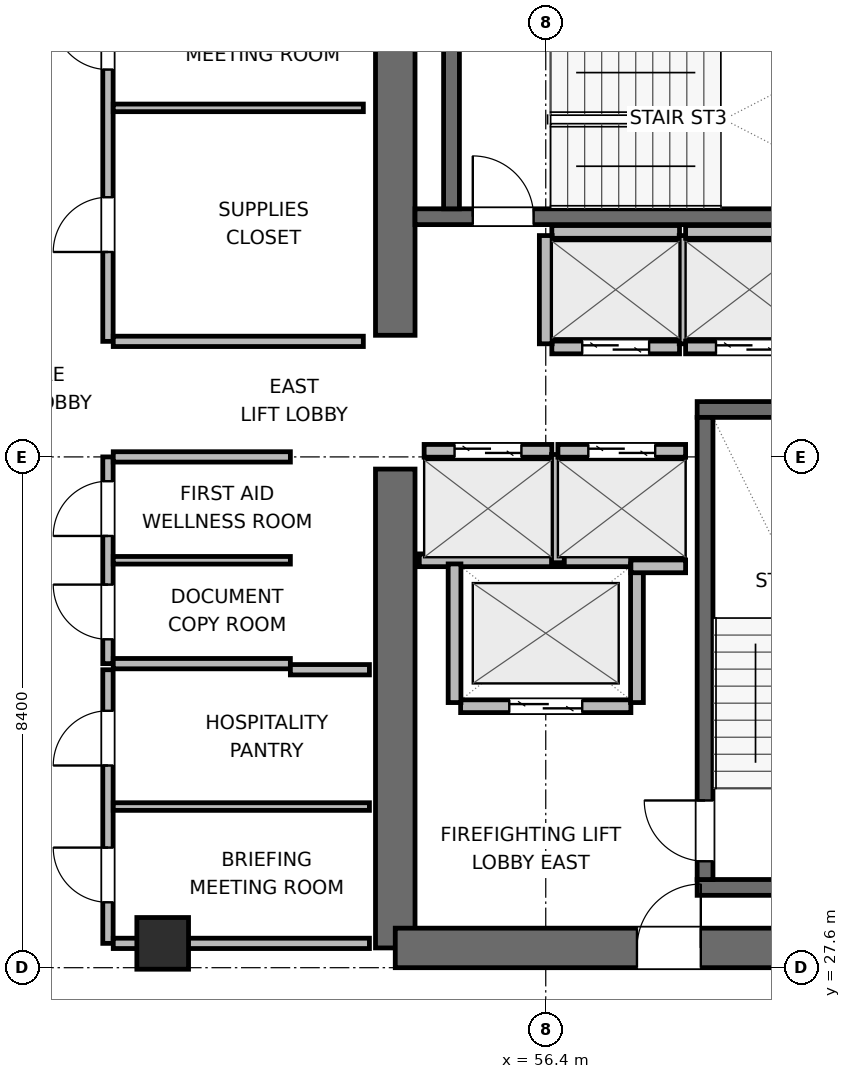
"""IFC4 building model, lengths in metres.
Left out: names, types, materials, properties, quantities, classifications, styles, units other than length and angle.
Written with IfcOpenShell. Run it as: python <this file> out.ifc"""

import sys

from ifc_helpers import new_model, si_unit, direction, frame, frame_2d, origin, origin_2d, place, context, subcontext, project, spatial, rectangle, extrude, element, fill, save


model = new_model("IFC4")
c1 = context("Model", 3, precision=1e-05, world=origin(), true_north=direction((0.0, 1.0)))
c2 = subcontext(c1, "Body", "Model", "MODEL_VIEW")
j1 = project(units=[si_unit("LENGTHUNIT", "METRE"), si_unit("PLANEANGLEUNIT", "RADIAN")], contexts=[c1])
p1 = place(None, origin())
s1 = spatial("IfcSite", under=j1, at=p1, CompositionType="ELEMENT")
p2 = place(p1, origin())
s2 = spatial("IfcBuilding", under=s1, at=p2, CompositionType="ELEMENT")
p3 = place(p2, frame((0.0, 0.0, 231.0)))
s3 = spatial("IfcBuildingStorey", under=s2, at=p3, CompositionType="ELEMENT", Elevation=231.0)
p4 = place(p3, frame((53.925, 27.925, 0.0), z_axis=(0.0, 0.0, 1.0), x_axis=(0.0, 1.0, 0.0)))
e1 = element("IfcWall", 1, at=p4, inside=s3, PredefinedType="SHEAR", context=c2, shape_type="SweptSolid", body=[
    extrude(rectangle(XDim=7.875, YDim=0.65, at=frame_2d((3.938, 0.0))), origin(), (0.0, 0.0, 1.0), 3.9),
])
p5 = place(p3, frame((53.925, 38.0, 0.0), z_axis=(0.0, 0.0, 1.0), x_axis=(0.0, 1.0, 0.0)))
e2 = element("IfcWall", 2, at=p5, inside=s3, PredefinedType="SHEAR", context=c2, shape_type="SweptSolid", body=[
    extrude(rectangle(XDim=6.075, YDim=0.65, at=frame_2d((3.038, 0.0))), origin(), (0.0, 0.0, 1.0), 3.9),
])
p6 = place(p3, frame((53.925, 27.925, 0.0), z_axis=(0.0, 0.0, 1.0), x_axis=(1.0, 0.0, 0.0)))
e3 = element("IfcWall", 3, at=p6, inside=s3, PredefinedType="SHEAR", context=c2, shape_type="SweptSolid", body=[
    extrude(rectangle(XDim=9.35, YDim=0.65, at=frame_2d((4.675, 0.0))), origin(), (0.0, 0.0, 1.0), 3.9),
])
p7 = place(p6, frame((3.975, 0.0, 0.0)))
e4 = element("IfcOpeningElement", 4, at=p7, cuts=e3, PredefinedType="OPENING", context=c2, shape_type="SweptSolid", body=[
    extrude(rectangle(XDim=1.05, YDim=2.04, at=frame_2d((0.525, 1.02))), frame((0.0, 0.335, 0.0), z_axis=(0.0, -1.0, 0.0), x_axis=(1.0, 0.0, 0.0)), (0.0, 0.0, 1.0), 0.67),
])
for number, where, z_axis, x_axis in (
    (5, (58.89, 28.92, 0.0), (0.0, 0.0, 1.0), (1.0, 0.0, 0.0)),
    (6, (58.89, 36.78, 0.0), (0.0, 0.0, 1.0), (1.0, 0.0, 0.0)),
):
    element("IfcWall", number, at=place(p3, frame(where, z_axis=z_axis, x_axis=x_axis)), inside=s3, PredefinedType="SHEAR", context=c2, shape_type="SweptSolid", body=[
        extrude(rectangle(XDim=4.06, YDim=0.26, at=frame_2d((2.03, 0.0))), origin(), (0.0, 0.0, 1.0), 3.9),
    ])
p8 = place(p3, frame((59.02, 29.05, 0.0), z_axis=(0.0, 0.0, 1.0), x_axis=(0.0, 1.0, 0.0)))
e7 = element("IfcWall", 7, at=p8, inside=s3, PredefinedType="SHEAR", context=c2, shape_type="SweptSolid", body=[
    extrude(rectangle(XDim=7.6, YDim=0.26, at=frame_2d((3.8, 0.0))), origin(), (0.0, 0.0, 1.0), 3.9),
])
p9 = place(p8, frame((0.3, 0.0, 0.0)))
e8 = element("IfcOpeningElement", 8, at=p9, cuts=e7, PredefinedType="OPENING", context=c2, shape_type="SweptSolid", body=[
    extrude(rectangle(XDim=1.0, YDim=2.04, at=frame_2d((0.5, 1.02))), frame((0.0, 0.14, 0.0), z_axis=(0.0, -1.0, 0.0), x_axis=(1.0, 0.0, 0.0)), (0.0, 0.0, 1.0), 0.28),
])
p10 = place(p3, frame((54.25, 39.95, 0.0), z_axis=(0.0, 0.0, 1.0), x_axis=(1.0, 0.0, 0.0)))
e9 = element("IfcWall", 9, at=p10, inside=s3, PredefinedType="SHEAR", context=c2, shape_type="SweptSolid", body=[
    extrude(rectangle(XDim=8.7, YDim=0.26, at=frame_2d((4.35, 0.0))), origin(), (0.0, 0.0, 1.0), 3.9),
])
p11 = place(p10, frame((0.95, 0.0, 0.0)))
e10 = element("IfcOpeningElement", 10, at=p11, cuts=e9, PredefinedType="OPENING", context=c2, shape_type="SweptSolid", body=[
    extrude(rectangle(XDim=1.0, YDim=2.04, at=frame_2d((0.5, 1.02))), frame((0.0, 0.14, 0.0), z_axis=(0.0, -1.0, 0.0), x_axis=(1.0, 0.0, 0.0)), (0.0, 0.0, 1.0), 0.28),
])
p12 = place(p3, frame((54.85, 40.08, 0.0), z_axis=(0.0, 0.0, 1.0), x_axis=(0.0, 1.0, 0.0)))
e11 = element("IfcWall", 11, at=p12, inside=s3, PredefinedType="SHEAR", context=c2, shape_type="SweptSolid", body=[
    extrude(rectangle(XDim=2.94, YDim=0.26, at=frame_2d((1.47, 0.0))), origin(), (0.0, 0.0, 1.0), 3.9),
])
p13 = place(p3, frame((50.1, 28.0, 0.0), z_axis=(0.0, 0.0, 1.0), x_axis=(1.0, 0.0, 0.0)))
e12 = element("IfcColumn", 12, at=p13, inside=s3, PredefinedType="COLUMN", context=c2, shape_type="SweptSolid", body=[
    extrude(rectangle(XDim=0.85, YDim=0.85, at=origin_2d()), origin(), (0.0, 0.0, 1.0), 3.9),
])
p14 = place(p3, frame((55.0, 31.9, 0.0), z_axis=(0.0, 0.0, 1.0), x_axis=(1.0, 0.0, 0.0)))
e13 = element("IfcWall", 13, at=p14, inside=s3, PredefinedType="PARTITIONING", context=c2, shape_type="SweptSolid", body=[
    extrude(rectangle(XDim=2.8, YDim=0.21, at=frame_2d((1.4, 0.0))), origin(), (0.0, 0.0, 1.0), 3.68),
])
p15 = place(p14, frame((0.8, 0.0, 0.0)))
e14 = element("IfcOpeningElement", 14, at=p15, cuts=e13, PredefinedType="OPENING", context=c2, shape_type="SweptSolid", body=[
    extrude(rectangle(XDim=1.2, YDim=2.04, at=frame_2d((0.6, 1.02))), frame((0.0, 0.115, 0.0), z_axis=(0.0, -1.0, 0.0), x_axis=(1.0, 0.0, 0.0)), (0.0, 0.0, 1.0), 0.23),
])
p16 = place(p3, frame((54.32, 34.3, 0.0), z_axis=(0.0, 0.0, 1.0), x_axis=(1.0, 0.0, 0.0)))
e15 = element("IfcWall", 15, at=p16, inside=s3, PredefinedType="PARTITIONING", context=c2, shape_type="SweptSolid", body=[
    extrude(rectangle(XDim=3.48, YDim=0.21, at=frame_2d((1.74, 0.0))), origin(), (0.0, 0.0, 1.0), 3.68),
])
for number, where, z_axis, x_axis in (
    (16, (54.9, 31.96, 0.0), (0.0, 0.0, 1.0), (0.0, 1.0, 0.0)),
    (17, (57.9, 31.96, 0.0), (0.0, 0.0, 1.0), (0.0, 1.0, 0.0)),
):
    element("IfcWall", number, at=place(p3, frame(where, z_axis=z_axis, x_axis=x_axis)), inside=s3, PredefinedType="PARTITIONING", context=c2, shape_type="SweptSolid", body=[
        extrude(rectangle(XDim=2.28, YDim=0.21, at=frame_2d((1.14, 0.0))), origin(), (0.0, 0.0, 1.0), 3.68),
    ])
p17 = place(p3, frame((54.4, 36.1, 0.0), z_axis=(0.0, 0.0, 1.0), x_axis=(1.0, 0.0, 0.0)))
e18 = element("IfcWall", 18, at=p17, inside=s3, PredefinedType="PARTITIONING", context=c2, shape_type="SweptSolid", body=[
    extrude(rectangle(XDim=2.1, YDim=0.21, at=frame_2d((1.05, 0.0))), origin(), (0.0, 0.0, 1.0), 3.68),
])
p18 = place(p17, frame((0.5, 0.0, 0.0)))
e19 = element("IfcOpeningElement", 19, at=p18, cuts=e18, PredefinedType="OPENING", context=c2, shape_type="SweptSolid", body=[
    extrude(rectangle(XDim=1.1, YDim=2.04, at=frame_2d((0.55, 1.02))), frame((0.0, 0.115, 0.0), z_axis=(0.0, -1.0, 0.0), x_axis=(1.0, 0.0, 0.0)), (0.0, 0.0, 1.0), 0.23),
])
p19 = place(p3, frame((56.6, 34.26, 0.0), z_axis=(0.0, 0.0, 1.0), x_axis=(0.0, 1.0, 0.0)))
e20 = element("IfcWall", 20, at=p19, inside=s3, PredefinedType="PARTITIONING", context=c2, shape_type="SweptSolid", body=[
    extrude(rectangle(XDim=1.78, YDim=0.21, at=frame_2d((0.89, 0.0))), origin(), (0.0, 0.0, 1.0), 3.68),
])
p20 = place(p3, frame((56.6, 36.1, 0.0), z_axis=(0.0, 0.0, 1.0), x_axis=(1.0, 0.0, 0.0)))
e21 = element("IfcWall", 21, at=p20, inside=s3, PredefinedType="PARTITIONING", context=c2, shape_type="SweptSolid", body=[
    extrude(rectangle(XDim=2.1, YDim=0.21, at=frame_2d((1.05, 0.0))), origin(), (0.0, 0.0, 1.0), 3.68),
])
p21 = place(p20, frame((0.5, 0.0, 0.0)))
e22 = element("IfcOpeningElement", 22, at=p21, cuts=e21, PredefinedType="OPENING", context=c2, shape_type="SweptSolid", body=[
    extrude(rectangle(XDim=1.1, YDim=2.04, at=frame_2d((0.55, 1.02))), frame((0.0, 0.115, 0.0), z_axis=(0.0, -1.0, 0.0), x_axis=(1.0, 0.0, 0.0)), (0.0, 0.0, 1.0), 0.23),
])
p22 = place(p3, frame((57.8, 34.2, 0.0), z_axis=(0.0, 0.0, 1.0), x_axis=(1.0, 0.0, 0.0)))
e23 = element("IfcWall", 23, at=p22, inside=s3, PredefinedType="PARTITIONING", context=c2, shape_type="SweptSolid", body=[
    extrude(rectangle(XDim=0.9, YDim=0.21, at=frame_2d((0.45, 0.0))), origin(), (0.0, 0.0, 1.0), 3.68),
])
p23 = place(p3, frame((56.5, 37.8, 0.0), z_axis=(0.0, 0.0, 1.0), x_axis=(1.0, 0.0, 0.0)))
e24 = element("IfcWall", 24, at=p23, inside=s3, PredefinedType="PARTITIONING", context=c2, shape_type="SweptSolid", body=[
    extrude(rectangle(XDim=2.1, YDim=0.21, at=frame_2d((1.05, 0.0))), origin(), (0.0, 0.0, 1.0), 3.68),
])
p24 = place(p23, frame((0.5, 0.0, 0.0)))
e25 = element("IfcOpeningElement", 25, at=p24, cuts=e24, PredefinedType="OPENING", context=c2, shape_type="SweptSolid", body=[
    extrude(rectangle(XDim=1.1, YDim=2.04, at=frame_2d((0.55, 1.02))), frame((0.0, 0.115, 0.0), z_axis=(0.0, -1.0, 0.0), x_axis=(1.0, 0.0, 0.0)), (0.0, 0.0, 1.0), 0.23),
])
p25 = place(p3, frame((56.5, 39.7, 0.0), z_axis=(0.0, 0.0, 1.0), x_axis=(1.0, 0.0, 0.0)))
e26 = element("IfcWall", 26, at=p25, inside=s3, PredefinedType="PARTITIONING", context=c2, shape_type="SweptSolid", body=[
    extrude(rectangle(XDim=2.1, YDim=0.21, at=frame_2d((1.05, 0.0))), origin(), (0.0, 0.0, 1.0), 3.68),
])
for number, where, z_axis, x_axis in (
    (27, (56.4, 37.86, 0.0), (0.0, 0.0, 1.0), (0.0, 1.0, 0.0)),
    (28, (58.7, 37.86, 0.0), (0.0, 0.0, 1.0), (0.0, 1.0, 0.0)),
):
    element("IfcWall", number, at=place(p3, frame(where, z_axis=z_axis, x_axis=x_axis)), inside=s3, PredefinedType="PARTITIONING", context=c2, shape_type="SweptSolid", body=[
        extrude(rectangle(XDim=1.78, YDim=0.21, at=frame_2d((0.89, 0.0))), origin(), (0.0, 0.0, 1.0), 3.68),
    ])
p26 = place(p3, frame((58.7, 37.8, 0.0), z_axis=(0.0, 0.0, 1.0), x_axis=(1.0, 0.0, 0.0)))
e29 = element("IfcWall", 29, at=p26, inside=s3, PredefinedType="PARTITIONING", context=c2, shape_type="SweptSolid", body=[
    extrude(rectangle(XDim=2.1, YDim=0.21, at=frame_2d((1.05, 0.0))), origin(), (0.0, 0.0, 1.0), 3.68),
])
p27 = place(p26, frame((0.5, 0.0, 0.0)))
e30 = element("IfcOpeningElement", 30, at=p27, cuts=e29, PredefinedType="OPENING", context=c2, shape_type="SweptSolid", body=[
    extrude(rectangle(XDim=1.1, YDim=2.04, at=frame_2d((0.55, 1.02))), frame((0.0, 0.115, 0.0), z_axis=(0.0, -1.0, 0.0), x_axis=(1.0, 0.0, 0.0)), (0.0, 0.0, 1.0), 0.23),
])
p28 = place(p3, frame((58.7, 39.7, 0.0), z_axis=(0.0, 0.0, 1.0), x_axis=(1.0, 0.0, 0.0)))
e31 = element("IfcWall", 31, at=p28, inside=s3, PredefinedType="PARTITIONING", context=c2, shape_type="SweptSolid", body=[
    extrude(rectangle(XDim=2.1, YDim=0.21, at=frame_2d((1.05, 0.0))), origin(), (0.0, 0.0, 1.0), 3.68),
])
p29 = place(p3, frame((49.2, 32.6, 0.0), z_axis=(0.0, 0.0, 1.0), x_axis=(0.0, 1.0, 0.0)))
e32 = element("IfcWall", 32, at=p29, inside=s3, PredefinedType="PARTITIONING", context=c2, shape_type="SweptSolid", body=[
    extrude(rectangle(XDim=3.4, YDim=0.17, at=frame_2d((1.7, 0.0))), origin(), (0.0, 0.0, 1.0), 3.68),
])
p30 = place(p29, frame((0.4, 0.0, 0.0)))
e33 = element("IfcOpeningElement", 33, at=p30, cuts=e32, PredefinedType="OPENING", context=c2, shape_type="SweptSolid", body=[
    extrude(rectangle(XDim=0.9, YDim=2.02, at=frame_2d((0.45, 1.01))), frame((0.0, 0.095, 0.0), z_axis=(0.0, -1.0, 0.0), x_axis=(1.0, 0.0, 0.0)), (0.0, 0.0, 1.0), 0.19),
])
p31 = place(p29, frame((2.1, 0.0, 0.0)))
e34 = element("IfcOpeningElement", 34, at=p31, cuts=e32, PredefinedType="OPENING", context=c2, shape_type="SweptSolid", body=[
    extrude(rectangle(XDim=0.9, YDim=2.02, at=frame_2d((0.45, 1.01))), frame((0.0, 0.095, 0.0), z_axis=(0.0, -1.0, 0.0), x_axis=(1.0, 0.0, 0.0)), (0.0, 0.0, 1.0), 0.19),
])
for number, where, z_axis, x_axis in (
    (35, (49.287, 32.6, 0.0), (0.0, 0.0, 1.0), (1.0, 0.0, 0.0)),
    (36, (49.287, 36.0, 0.0), (0.0, 0.0, 1.0), (1.0, 0.0, 0.0)),
):
    element("IfcWall", number, at=place(p3, frame(where, z_axis=z_axis, x_axis=x_axis)), inside=s3, PredefinedType="PARTITIONING", context=c2, shape_type="SweptSolid", body=[
        extrude(rectangle(XDim=2.913, YDim=0.17, at=frame_2d((1.457, 0.0))), origin(), (0.0, 0.0, 1.0), 3.68),
    ])
p32 = place(p3, frame((49.287, 34.3, 0.0), z_axis=(0.0, 0.0, 1.0), x_axis=(1.0, 0.0, 0.0)))
e37 = element("IfcWall", 37, at=p32, inside=s3, PredefinedType="PARTITIONING", context=c2, shape_type="SweptSolid", body=[
    extrude(rectangle(XDim=2.913, YDim=0.125, at=frame_2d((1.457, 0.0))), origin(), (0.0, 0.0, 1.0), 3.68),
])
p33 = place(p3, frame((49.2, 28.0, 0.0), z_axis=(0.0, 0.0, 1.0), x_axis=(0.0, 1.0, 0.0)))
e38 = element("IfcWall", 38, at=p33, inside=s3, PredefinedType="PARTITIONING", context=c2, shape_type="SweptSolid", body=[
    extrude(rectangle(XDim=4.5, YDim=0.17, at=frame_2d((2.25, 0.0))), origin(), (0.0, 0.0, 1.0), 3.68),
])
p34 = place(p33, frame((0.675, 0.0, 0.0)))
e39 = element("IfcOpeningElement", 39, at=p34, cuts=e38, PredefinedType="OPENING", context=c2, shape_type="SweptSolid", body=[
    extrude(rectangle(XDim=0.9, YDim=2.02, at=frame_2d((0.45, 1.01))), frame((0.0, 0.095, 0.0), z_axis=(0.0, -1.0, 0.0), x_axis=(1.0, 0.0, 0.0)), (0.0, 0.0, 1.0), 0.19),
])
p35 = place(p33, frame((2.925, 0.0, 0.0)))
e40 = element("IfcOpeningElement", 40, at=p35, cuts=e38, PredefinedType="OPENING", context=c2, shape_type="SweptSolid", body=[
    extrude(rectangle(XDim=0.9, YDim=2.02, at=frame_2d((0.45, 1.01))), frame((0.0, 0.095, 0.0), z_axis=(0.0, -1.0, 0.0), x_axis=(1.0, 0.0, 0.0)), (0.0, 0.0, 1.0), 0.19),
])
p36 = place(p3, frame((49.287, 28.0, 0.0), z_axis=(0.0, 0.0, 1.0), x_axis=(1.0, 0.0, 0.0)))
e41 = element("IfcWall", 41, at=p36, inside=s3, PredefinedType="PARTITIONING", context=c2, shape_type="SweptSolid", body=[
    extrude(rectangle(XDim=4.213, YDim=0.17, at=frame_2d((2.106, 0.0))), origin(), (0.0, 0.0, 1.0), 2.765),
])
p37 = place(p3, frame((52.2, 32.5, 0.0), z_axis=(0.0, 0.0, 1.0), x_axis=(1.0, 0.0, 0.0)))
e42 = element("IfcWall", 42, at=p37, inside=s3, PredefinedType="PARTITIONING", context=c2, shape_type="SweptSolid", body=[
    extrude(rectangle(XDim=1.3, YDim=0.17, at=frame_2d((0.65, 0.0))), origin(), (0.0, 0.0, 1.0), 3.68),
])
p38 = place(p3, frame((49.287, 30.25, 0.0), z_axis=(0.0, 0.0, 1.0), x_axis=(1.0, 0.0, 0.0)))
e43 = element("IfcWall", 43, at=p38, inside=s3, PredefinedType="PARTITIONING", context=c2, shape_type="SweptSolid", body=[
    extrude(rectangle(XDim=4.213, YDim=0.125, at=frame_2d((2.106, 0.0))), origin(), (0.0, 0.0, 1.0), 3.68),
])
p39 = place(p3, frame((49.2, 37.9, 0.0), z_axis=(0.0, 0.0, 1.0), x_axis=(0.0, 1.0, 0.0)))
e44 = element("IfcWall", 44, at=p39, inside=s3, PredefinedType="PARTITIONING", context=c2, shape_type="SweptSolid", body=[
    extrude(rectangle(XDim=6.0, YDim=0.17, at=frame_2d((3.0, 0.0))), origin(), (0.0, 0.0, 1.0), 3.68),
])
p40 = place(p39, frame((1.47, 0.0, 0.0)))
e45 = element("IfcOpeningElement", 45, at=p40, cuts=e44, PredefinedType="OPENING", context=c2, shape_type="SweptSolid", body=[
    extrude(rectangle(XDim=0.9, YDim=2.02, at=frame_2d((0.45, 1.01))), frame((0.0, 0.095, 0.0), z_axis=(0.0, -1.0, 0.0), x_axis=(1.0, 0.0, 0.0)), (0.0, 0.0, 1.0), 0.19),
])
p41 = place(p39, frame((4.47, 0.0, 0.0)))
e46 = element("IfcOpeningElement", 46, at=p41, cuts=e44, PredefinedType="OPENING", context=c2, shape_type="SweptSolid", body=[
    extrude(rectangle(XDim=0.9, YDim=2.02, at=frame_2d((0.45, 1.01))), frame((0.0, 0.095, 0.0), z_axis=(0.0, -1.0, 0.0), x_axis=(1.0, 0.0, 0.0)), (0.0, 0.0, 1.0), 0.19),
])
p42 = place(p3, frame((49.287, 37.9, 0.0), z_axis=(0.0, 0.0, 1.0), x_axis=(1.0, 0.0, 0.0)))
e47 = element("IfcWall", 47, at=p42, inside=s3, PredefinedType="PARTITIONING", context=c2, shape_type="SweptSolid", body=[
    extrude(rectangle(XDim=4.113, YDim=0.17, at=frame_2d((2.056, 0.0))), origin(), (0.0, 0.0, 1.0), 3.68),
])
p43 = place(p3, frame((49.287, 41.74, 0.0), z_axis=(0.0, 0.0, 1.0), x_axis=(1.0, 0.0, 0.0)))
e48 = element("IfcWall", 48, at=p43, inside=s3, PredefinedType="PARTITIONING", context=c2, shape_type="SweptSolid", body=[
    extrude(rectangle(XDim=4.113, YDim=0.125, at=frame_2d((2.056, 0.0))), origin(), (0.0, 0.0, 1.0), 3.68),
])
p44 = place(p9, origin())
e49 = element("IfcDoor", 49, at=p44, inside=s3, OperationType="SINGLE_SWING_RIGHT", PredefinedType="DOOR", context=c2, shape_type="SweptSolid", body=[
    extrude(rectangle(XDim=1.0, YDim=2.04, at=frame_2d((0.5, 1.02))), frame((0.0, 0.025, 0.0), z_axis=(0.0, -1.0, 0.0), x_axis=(1.0, 0.0, 0.0)), (0.0, 0.0, 1.0), 0.05),
])
fill(e8, e49)
p45 = place(p11, origin())
e50 = element("IfcDoor", 50, at=p45, inside=s3, OperationType="SINGLE_SWING_LEFT", PredefinedType="DOOR", context=c2, shape_type="SweptSolid", body=[
    extrude(rectangle(XDim=1.0, YDim=2.04, at=frame_2d((0.5, 1.02))), frame((0.0, 0.025, 0.0), z_axis=(0.0, -1.0, 0.0), x_axis=(1.0, 0.0, 0.0)), (0.0, 0.0, 1.0), 0.05),
])
fill(e10, e50)
p46 = place(p15, origin())
e51 = element("IfcDoor", 51, at=p46, inside=s3, OperationType="DOUBLE_DOOR_SLIDING", PredefinedType="DOOR", context=c2, shape_type="SweptSolid", body=[
    extrude(rectangle(XDim=1.2, YDim=2.04, at=frame_2d((0.6, 1.02))), frame((0.0, 0.025, 0.0), z_axis=(0.0, -1.0, 0.0), x_axis=(1.0, 0.0, 0.0)), (0.0, 0.0, 1.0), 0.05),
])
fill(e14, e51)
p47 = place(p18, origin())
e52 = element("IfcDoor", 52, at=p47, inside=s3, OperationType="DOUBLE_DOOR_SLIDING", PredefinedType="DOOR", context=c2, shape_type="SweptSolid", body=[
    extrude(rectangle(XDim=1.1, YDim=2.04, at=frame_2d((0.55, 1.02))), frame((0.0, 0.025, 0.0), z_axis=(0.0, -1.0, 0.0), x_axis=(1.0, 0.0, 0.0)), (0.0, 0.0, 1.0), 0.05),
])
fill(e19, e52)
p48 = place(p21, origin())
e53 = element("IfcDoor", 53, at=p48, inside=s3, OperationType="DOUBLE_DOOR_SLIDING", PredefinedType="DOOR", context=c2, shape_type="SweptSolid", body=[
    extrude(rectangle(XDim=1.1, YDim=2.04, at=frame_2d((0.55, 1.02))), frame((0.0, 0.025, 0.0), z_axis=(0.0, -1.0, 0.0), x_axis=(1.0, 0.0, 0.0)), (0.0, 0.0, 1.0), 0.05),
])
fill(e22, e53)
p49 = place(p24, origin())
e54 = element("IfcDoor", 54, at=p49, inside=s3, OperationType="DOUBLE_DOOR_SLIDING", PredefinedType="DOOR", context=c2, shape_type="SweptSolid", body=[
    extrude(rectangle(XDim=1.1, YDim=2.04, at=frame_2d((0.55, 1.02))), frame((0.0, 0.025, 0.0), z_axis=(0.0, -1.0, 0.0), x_axis=(1.0, 0.0, 0.0)), (0.0, 0.0, 1.0), 0.05),
])
fill(e25, e54)
p50 = place(p27, origin())
e55 = element("IfcDoor", 55, at=p50, inside=s3, OperationType="DOUBLE_DOOR_SLIDING", PredefinedType="DOOR", context=c2, shape_type="SweptSolid", body=[
    extrude(rectangle(XDim=1.1, YDim=2.04, at=frame_2d((0.55, 1.02))), frame((0.0, 0.025, 0.0), z_axis=(0.0, -1.0, 0.0), x_axis=(1.0, 0.0, 0.0)), (0.0, 0.0, 1.0), 0.05),
])
fill(e30, e55)
p51 = place(p7, origin())
e56 = element("IfcDoor", 56, at=p51, inside=s3, OperationType="SINGLE_SWING_RIGHT", PredefinedType="DOOR", context=c2, shape_type="SweptSolid", body=[
    extrude(rectangle(XDim=1.05, YDim=2.04, at=frame_2d((0.525, 1.02))), frame((0.0, 0.025, 0.0), z_axis=(0.0, -1.0, 0.0), x_axis=(1.0, 0.0, 0.0)), (0.0, 0.0, 1.0), 0.05),
])
fill(e4, e56)
p52 = place(p30, origin())
e57 = element("IfcDoor", 57, at=p52, inside=s3, OperationType="SINGLE_SWING_RIGHT", PredefinedType="DOOR", context=c2, shape_type="SweptSolid", body=[
    extrude(rectangle(XDim=0.9, YDim=2.02, at=frame_2d((0.45, 1.01))), frame((0.0, 0.025, 0.0), z_axis=(0.0, -1.0, 0.0), x_axis=(1.0, 0.0, 0.0)), (0.0, 0.0, 1.0), 0.05),
])
fill(e33, e57)
p53 = place(p31, origin())
e58 = element("IfcDoor", 58, at=p53, inside=s3, OperationType="SINGLE_SWING_LEFT", PredefinedType="DOOR", context=c2, shape_type="SweptSolid", body=[
    extrude(rectangle(XDim=0.9, YDim=2.02, at=frame_2d((0.45, 1.01))), frame((0.0, 0.025, 0.0), z_axis=(0.0, -1.0, 0.0), x_axis=(1.0, 0.0, 0.0)), (0.0, 0.0, 1.0), 0.05),
])
fill(e34, e58)
p54 = place(p34, origin())
e59 = element("IfcDoor", 59, at=p54, inside=s3, OperationType="SINGLE_SWING_RIGHT", PredefinedType="DOOR", context=c2, shape_type="SweptSolid", body=[
    extrude(rectangle(XDim=0.9, YDim=2.02, at=frame_2d((0.45, 1.01))), frame((0.0, 0.025, 0.0), z_axis=(0.0, -1.0, 0.0), x_axis=(1.0, 0.0, 0.0)), (0.0, 0.0, 1.0), 0.05),
])
fill(e39, e59)
p55 = place(p35, origin())
e60 = element("IfcDoor", 60, at=p55, inside=s3, OperationType="SINGLE_SWING_LEFT", PredefinedType="DOOR", context=c2, shape_type="SweptSolid", body=[
    extrude(rectangle(XDim=0.9, YDim=2.02, at=frame_2d((0.45, 1.01))), frame((0.0, 0.025, 0.0), z_axis=(0.0, -1.0, 0.0), x_axis=(1.0, 0.0, 0.0)), (0.0, 0.0, 1.0), 0.05),
])
fill(e40, e60)
p56 = place(p40, origin())
e61 = element("IfcDoor", 61, at=p56, inside=s3, OperationType="SINGLE_SWING_LEFT", PredefinedType="DOOR", context=c2, shape_type="SweptSolid", body=[
    extrude(rectangle(XDim=0.9, YDim=2.02, at=frame_2d((0.45, 1.01))), frame((0.0, 0.025, 0.0), z_axis=(0.0, -1.0, 0.0), x_axis=(1.0, 0.0, 0.0)), (0.0, 0.0, 1.0), 0.05),
])
fill(e45, e61)
p57 = place(p41, origin())
e62 = element("IfcDoor", 62, at=p57, inside=s3, OperationType="SINGLE_SWING_RIGHT", PredefinedType="DOOR", context=c2, shape_type="SweptSolid", body=[
    extrude(rectangle(XDim=0.9, YDim=2.02, at=frame_2d((0.45, 1.01))), frame((0.0, 0.025, 0.0), z_axis=(0.0, -1.0, 0.0), x_axis=(1.0, 0.0, 0.0)), (0.0, 0.0, 1.0), 0.05),
])
fill(e46, e62)
save(model, sys.argv[1])
